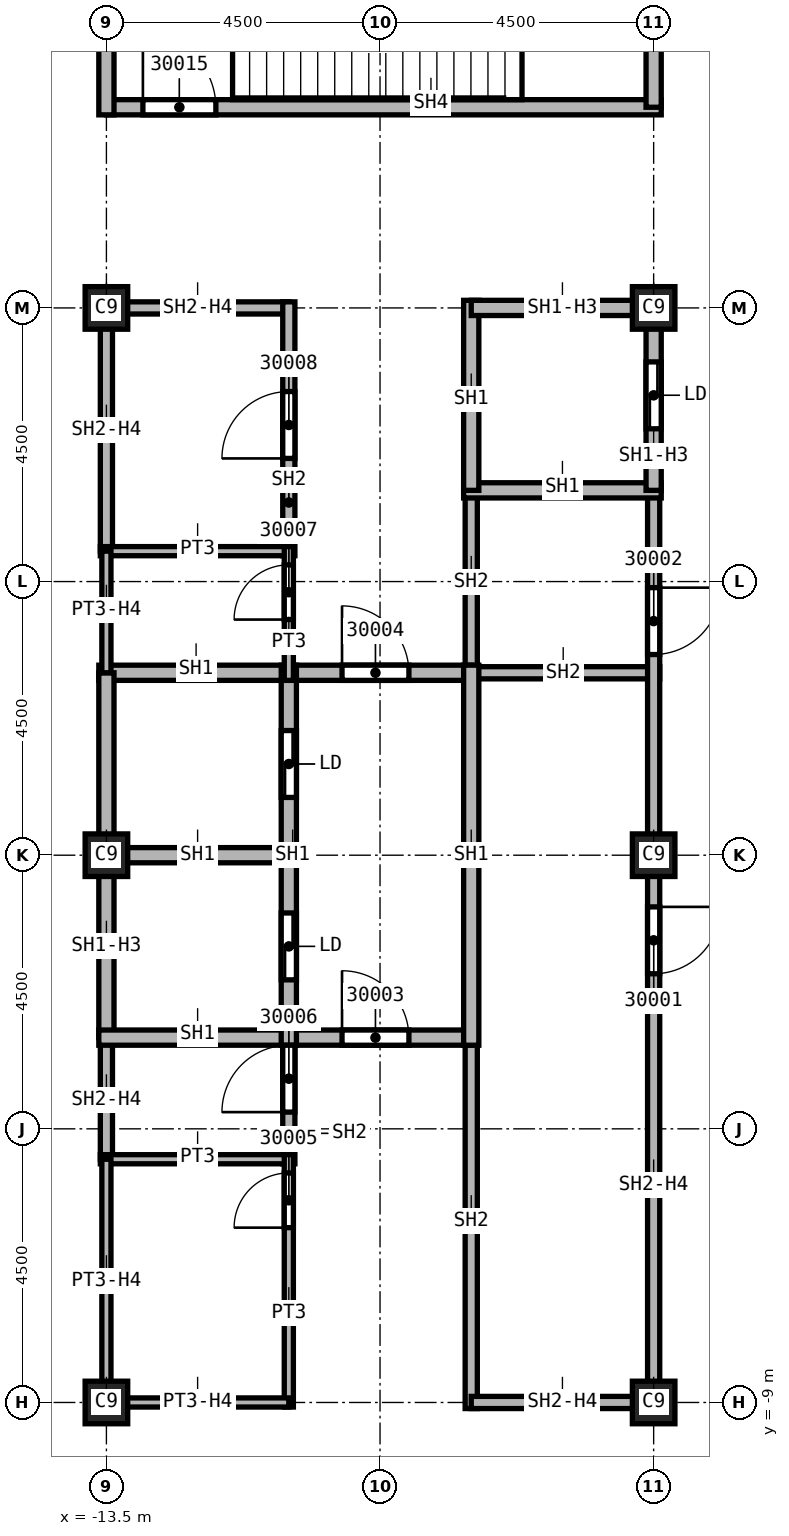
"""IFC4 building model, lengths in metres.
Left out: names, types, materials, properties, quantities, classifications, styles, units other than length and angle.
Written with IfcOpenShell. Run it as: python <this file> out.ifc"""

import sys

from ifc_helpers import new_model, si_unit, direction, frame, frame_2d, origin, origin_2d, place, context, subcontext, project, spatial, rectangle, extrude, element, fill, save


model = new_model("IFC4")
c1 = context("Model", 3, precision=1e-05, world=origin(), true_north=direction((0.0, 1.0)))
c2 = subcontext(c1, "Body", "Model", "MODEL_VIEW")
j1 = project(units=[si_unit("LENGTHUNIT", "METRE"), si_unit("PLANEANGLEUNIT", "RADIAN")], contexts=[c1])
p1 = place(None, origin())
s1 = spatial("IfcSite", under=j1, at=p1, CompositionType="ELEMENT")
p2 = place(p1, origin())
s2 = spatial("IfcBuilding", under=s1, at=p2, CompositionType="ELEMENT")
p3 = place(p2, frame((0.0, 0.0, 320.0)))
s3 = spatial("IfcBuildingStorey", under=s2, at=p3, CompositionType="ELEMENT", Elevation=320.0)
for number, where, z_axis, x_axis in (
    (1, (-4.5, 0.0, 0.0), (0.0, 0.0, 1.0), (1.0, 0.0, 0.0)),
    (2, (-4.5, 9.0, 0.0), (0.0, 0.0, 1.0), (1.0, 0.0, 0.0)),
    (3, (-4.5, -9.0, 0.0), (0.0, 0.0, 1.0), (1.0, 0.0, 0.0)),
    (4, (-13.5, 0.0, 0.0), (0.0, 0.0, 1.0), (1.0, 0.0, 0.0)),
    (5, (-13.5, 9.0, 0.0), (0.0, 0.0, 1.0), (1.0, 0.0, 0.0)),
    (6, (-13.5, -9.0, 0.0), (0.0, 0.0, 1.0), (1.0, 0.0, 0.0)),
):
    element("IfcColumn", number, at=place(p3, frame(where, z_axis=z_axis, x_axis=x_axis)), inside=s3, PredefinedType="COLUMN", context=c2, shape_type="SweptSolid", body=[
        extrude(rectangle(XDim=0.7, YDim=0.7, at=origin_2d()), origin(), (0.0, 0.0, 1.0), 5.74),
    ])
p4 = place(p3, frame((-13.5, -5.0, 0.0), z_axis=(0.0, 0.0, 1.0), x_axis=(0.0, 1.0, 0.0)))
e7 = element("IfcWall", 7, at=p4, inside=s3, PredefinedType="SOLIDWALL", context=c2, shape_type="SweptSolid", body=[
    extrude(rectangle(XDim=2.0, YDim=0.2, at=frame_2d((1.0, 0.0))), origin(), (0.0, 0.0, 1.0), 5.062),
])
p5 = place(p3, frame((-13.5, 5.0, 0.0), z_axis=(0.0, 0.0, 1.0), x_axis=(0.0, 1.0, 0.0)))
e8 = element("IfcWall", 8, at=p5, inside=s3, PredefinedType="SOLIDWALL", context=c2, shape_type="SweptSolid", body=[
    extrude(rectangle(XDim=4.1, YDim=0.2, at=frame_2d((2.05, 0.0))), origin(), (0.0, 0.0, 1.0), 5.062),
])
p6 = place(p3, frame((-13.5, 9.0, 0.0), z_axis=(0.0, 0.0, 1.0), x_axis=(1.0, 0.0, 0.0)))
e9 = element("IfcWall", 9, at=p6, inside=s3, PredefinedType="SOLIDWALL", context=c2, shape_type="SweptSolid", body=[
    extrude(rectangle(XDim=3.0, YDim=0.2, at=frame_2d((1.5, 0.0))), origin(), (0.0, 0.0, 1.0), 5.062),
])
p7 = place(p3, frame((-10.5, -5.075, 0.0), z_axis=(0.0, 0.0, 1.0), x_axis=(0.0, 1.0, 0.0)))
e10 = element("IfcWall", 10, at=p7, inside=s3, PredefinedType="SOLIDWALL", context=c2, shape_type="SweptSolid", body=[
    extrude(rectangle(XDim=2.2, YDim=0.2, at=frame_2d((1.1, 0.0))), origin(), (0.0, 0.0, 1.0), 5.74),
])
p8 = place(p7, frame((0.85, 0.0, 0.0)))
e11 = element("IfcOpeningElement", 11, at=p8, cuts=e10, PredefinedType="OPENING", context=c2, shape_type="SweptSolid", body=[
    extrude(rectangle(XDim=1.1, YDim=2.1, at=frame_2d((0.55, 1.05))), frame((0.0, 0.1, 0.0), z_axis=(0.0, -1.0, 0.0), x_axis=(1.0, 0.0, 0.0)), (0.0, 0.0, 1.0), 0.2),
])
p9 = place(p3, frame((-10.5, 4.925, 0.0), z_axis=(0.0, 0.0, 1.0), x_axis=(0.0, 1.0, 0.0)))
e12 = element("IfcWall", 12, at=p9, inside=s3, PredefinedType="SOLIDWALL", context=c2, shape_type="SweptSolid", body=[
    extrude(rectangle(XDim=4.175, YDim=0.2, at=frame_2d((2.087, 0.0))), origin(), (0.0, 0.0, 1.0), 5.74),
])
p10 = place(p9, frame((1.6, 0.0, 0.0)))
e13 = element("IfcOpeningElement", 13, at=p10, cuts=e12, PredefinedType="OPENING", context=c2, shape_type="SweptSolid", body=[
    extrude(rectangle(XDim=1.1, YDim=2.1, at=frame_2d((0.55, 1.05))), frame((0.0, 0.1, 0.0), z_axis=(0.0, -1.0, 0.0), x_axis=(1.0, 0.0, 0.0)), (0.0, 0.0, 1.0), 0.2),
])
p11 = place(p3, frame((-7.625, 3.0, 0.0), z_axis=(0.0, 0.0, 1.0), x_axis=(1.0, 0.0, 0.0)))
e14 = element("IfcWall", 14, at=p11, inside=s3, PredefinedType="SOLIDWALL", context=c2, shape_type="SweptSolid", body=[
    extrude(rectangle(XDim=3.225, YDim=0.2, at=frame_2d((1.613, 0.0))), origin(), (0.0, 0.0, 1.0), 5.74),
])
p12 = place(p3, frame((-7.5, -9.1, 0.0), z_axis=(0.0, 0.0, 1.0), x_axis=(0.0, 1.0, 0.0)))
e15 = element("IfcWall", 15, at=p12, inside=s3, PredefinedType="SOLIDWALL", context=c2, shape_type="SweptSolid", body=[
    extrude(rectangle(XDim=6.225, YDim=0.2, at=frame_2d((3.113, 0.0))), origin(), (0.0, 0.0, 1.0), 5.74),
])
p13 = place(p3, frame((-7.5, 2.875, 0.0), z_axis=(0.0, 0.0, 1.0), x_axis=(0.0, 1.0, 0.0)))
e16 = element("IfcWall", 16, at=p13, inside=s3, PredefinedType="SOLIDWALL", context=c2, shape_type="SweptSolid", body=[
    extrude(rectangle(XDim=3.125, YDim=0.2, at=frame_2d((1.562, 0.0))), origin(), (0.0, 0.0, 1.0), 5.74),
])
p14 = place(p3, frame((-4.5, -9.0, 0.0), z_axis=(0.0, 0.0, 1.0), x_axis=(-1.0, 0.0, 0.0)))
e17 = element("IfcWall", 17, at=p14, inside=s3, PredefinedType="SOLIDWALL", context=c2, shape_type="SweptSolid", body=[
    extrude(rectangle(XDim=3.0, YDim=0.2, at=frame_2d((1.5, 0.0))), origin(), (0.0, 0.0, 1.0), 5.062),
])
p15 = place(p3, frame((-4.5, 6.0, 0.0), z_axis=(0.0, 0.0, 1.0), x_axis=(0.0, -1.0, 0.0)))
e18 = element("IfcWall", 18, at=p15, inside=s3, PredefinedType="SOLIDWALL", context=c2, shape_type="SweptSolid", body=[
    extrude(rectangle(XDim=15.1, YDim=0.2, at=frame_2d((7.55, 0.0))), origin(), (0.0, 0.0, 1.0), 5.062),
])
p16 = place(p15, frame((6.85, 0.0, 0.0)))
e19 = element("IfcOpeningElement", 19, at=p16, cuts=e18, PredefinedType="OPENING", context=c2, shape_type="SweptSolid", body=[
    extrude(rectangle(XDim=1.1, YDim=2.1, at=frame_2d((0.55, 1.05))), frame((0.0, 0.1, 0.0), z_axis=(0.0, -1.0, 0.0), x_axis=(1.0, 0.0, 0.0)), (0.0, 0.0, 1.0), 0.2),
])
p17 = place(p15, frame((1.6, 0.0, 0.0)))
e20 = element("IfcOpeningElement", 20, at=p17, cuts=e18, PredefinedType="OPENING", context=c2, shape_type="SweptSolid", body=[
    extrude(rectangle(XDim=1.1, YDim=2.1, at=frame_2d((0.55, 1.05))), frame((0.0, 0.1, 0.0), z_axis=(0.0, -1.0, 0.0), x_axis=(1.0, 0.0, 0.0)), (0.0, 0.0, 1.0), 0.2),
])
p18 = place(p3, frame((-13.625, 0.0, 0.0), z_axis=(0.0, 0.0, 1.0), x_axis=(1.0, 0.0, 0.0)))
e21 = element("IfcWall", 21, at=p18, inside=s3, PredefinedType="SOLIDWALL", context=c2, shape_type="SweptSolid", body=[
    extrude(rectangle(XDim=3.125, YDim=0.25, at=frame_2d((1.562, 0.0))), origin(), (0.0, 0.0, 1.0), 5.74),
])
p19 = place(p3, frame((-13.625, 3.0, 0.0), z_axis=(0.0, 0.0, 1.0), x_axis=(1.0, 0.0, 0.0)))
e22 = element("IfcWall", 22, at=p19, inside=s3, PredefinedType="SOLIDWALL", context=c2, shape_type="SweptSolid", body=[
    extrude(rectangle(XDim=6.125, YDim=0.25, at=frame_2d((3.062, 0.0))), origin(), (0.0, 0.0, 1.0), 5.74),
])
p20 = place(p19, frame((4.0, 0.0, 0.0)))
e23 = element("IfcOpeningElement", 23, at=p20, cuts=e22, PredefinedType="OPENING", context=c2, shape_type="SweptSolid", body=[
    extrude(rectangle(XDim=1.1, YDim=2.1, at=frame_2d((0.55, 1.05))), frame((0.0, 0.125, 0.0), z_axis=(0.0, -1.0, 0.0), x_axis=(1.0, 0.0, 0.0)), (0.0, 0.0, 1.0), 0.25),
])
p21 = place(p3, frame((-13.5, -3.0, 0.0), z_axis=(0.0, 0.0, 1.0), x_axis=(0.0, 1.0, 0.0)))
e24 = element("IfcWall", 24, at=p21, inside=s3, PredefinedType="SOLIDWALL", context=c2, shape_type="SweptSolid", body=[
    extrude(rectangle(XDim=6.0, YDim=0.25, at=frame_2d((3.0, 0.0))), origin(), (0.0, 0.0, 1.0), 5.062),
])
p22 = place(p3, frame((-13.625, -3.0, 0.0), z_axis=(0.0, 0.0, 1.0), x_axis=(1.0, 0.0, 0.0)))
e25 = element("IfcWall", 25, at=p22, inside=s3, PredefinedType="SOLIDWALL", context=c2, shape_type="SweptSolid", body=[
    extrude(rectangle(XDim=6.125, YDim=0.25, at=frame_2d((3.062, 0.0))), origin(), (0.0, 0.0, 1.0), 5.74),
])
p23 = place(p22, frame((4.0, 0.0, 0.0)))
e26 = element("IfcOpeningElement", 26, at=p23, cuts=e25, PredefinedType="OPENING", context=c2, shape_type="SweptSolid", body=[
    extrude(rectangle(XDim=1.1, YDim=2.1, at=frame_2d((0.55, 1.05))), frame((0.0, 0.125, 0.0), z_axis=(0.0, -1.0, 0.0), x_axis=(1.0, 0.0, 0.0)), (0.0, 0.0, 1.0), 0.25),
])
p24 = place(p3, frame((-10.5, -3.125, 0.0), z_axis=(0.0, 0.0, 1.0), x_axis=(0.0, 1.0, 0.0)))
e27 = element("IfcWall", 27, at=p24, inside=s3, PredefinedType="SOLIDWALL", context=c2, shape_type="SweptSolid", body=[
    extrude(rectangle(XDim=6.25, YDim=0.25, at=frame_2d((3.125, 0.0))), origin(), (0.0, 0.0, 1.0), 5.74),
])
p25 = place(p24, frame((1.075, 0.0, 0.0)))
e28 = element("IfcOpeningElement", 28, at=p25, cuts=e27, PredefinedType="OPENING", context=c2, shape_type="SweptSolid", body=[
    extrude(rectangle(XDim=1.1, YDim=2.1, at=frame_2d((0.55, 1.05))), frame((0.0, 0.125, 0.0), z_axis=(0.0, -1.0, 0.0), x_axis=(1.0, 0.0, 0.0)), (0.0, 0.0, 1.0), 0.25),
])
p26 = place(p24, frame((4.075, 0.0, 0.0)))
e29 = element("IfcOpeningElement", 29, at=p26, cuts=e27, PredefinedType="OPENING", context=c2, shape_type="SweptSolid", body=[
    extrude(rectangle(XDim=1.1, YDim=2.1, at=frame_2d((0.55, 1.05))), frame((0.0, 0.125, 0.0), z_axis=(0.0, -1.0, 0.0), x_axis=(1.0, 0.0, 0.0)), (0.0, 0.0, 1.0), 0.25),
])
p27 = place(p3, frame((-7.625, 6.0, 0.0), z_axis=(0.0, 0.0, 1.0), x_axis=(1.0, 0.0, 0.0)))
e30 = element("IfcWall", 30, at=p27, inside=s3, PredefinedType="SOLIDWALL", context=c2, shape_type="SweptSolid", body=[
    extrude(rectangle(XDim=3.25, YDim=0.25, at=frame_2d((1.625, 0.0))), origin(), (0.0, 0.0, 1.0), 5.74),
])
p28 = place(p3, frame((-7.5, -3.125, 0.0), z_axis=(0.0, 0.0, 1.0), x_axis=(0.0, 1.0, 0.0)))
e31 = element("IfcWall", 31, at=p28, inside=s3, PredefinedType="SOLIDWALL", context=c2, shape_type="SweptSolid", body=[
    extrude(rectangle(XDim=6.25, YDim=0.25, at=frame_2d((3.125, 0.0))), origin(), (0.0, 0.0, 1.0), 5.74),
])
p29 = place(p3, frame((-7.5, 6.0, 0.0), z_axis=(0.0, 0.0, 1.0), x_axis=(0.0, 1.0, 0.0)))
e32 = element("IfcWall", 32, at=p29, inside=s3, PredefinedType="SOLIDWALL", context=c2, shape_type="SweptSolid", body=[
    extrude(rectangle(XDim=3.125, YDim=0.25, at=frame_2d((1.562, 0.0))), origin(), (0.0, 0.0, 1.0), 5.74),
])
p30 = place(p3, frame((-7.5, 9.0, 0.0), z_axis=(0.0, 0.0, 1.0), x_axis=(1.0, 0.0, 0.0)))
e33 = element("IfcWall", 33, at=p30, inside=s3, PredefinedType="SOLIDWALL", context=c2, shape_type="SweptSolid", body=[
    extrude(rectangle(XDim=3.0, YDim=0.25, at=frame_2d((1.5, 0.0))), origin(), (0.0, 0.0, 1.0), 5.062),
])
p31 = place(p3, frame((-4.5, 9.125, 0.0), z_axis=(0.0, 0.0, 1.0), x_axis=(0.0, -1.0, 0.0)))
e34 = element("IfcWall", 34, at=p31, inside=s3, PredefinedType="SOLIDWALL", context=c2, shape_type="SweptSolid", body=[
    extrude(rectangle(XDim=3.125, YDim=0.25, at=frame_2d((1.562, 0.0))), origin(), (0.0, 0.0, 1.0), 5.062),
])
p32 = place(p31, frame((1.012, 0.0, 0.0)))
e35 = element("IfcOpeningElement", 35, at=p32, cuts=e34, PredefinedType="OPENING", context=c2, shape_type="SweptSolid", body=[
    extrude(rectangle(XDim=1.1, YDim=2.1, at=frame_2d((0.55, 1.05))), frame((0.0, 0.125, 0.0), z_axis=(0.0, -1.0, 0.0), x_axis=(1.0, 0.0, 0.0)), (0.0, 0.0, 1.0), 0.25),
])
p33 = place(p3, frame((-13.5, 12.3, 0.0), z_axis=(0.0, 0.0, 1.0), x_axis=(1.0, 0.0, 0.0)))
e36 = element("IfcWall", 36, at=p33, inside=s3, PredefinedType="SOLIDWALL", context=c2, shape_type="SweptSolid", body=[
    extrude(rectangle(XDim=9.125, YDim=0.25, at=frame_2d((4.562, 0.0))), origin(), (0.0, 0.0, 1.0), 5.74),
])
p34 = place(p33, frame((0.6, 0.0, 0.0)))
e37 = element("IfcOpeningElement", 37, at=p34, cuts=e36, PredefinedType="OPENING", context=c2, shape_type="SweptSolid", body=[
    extrude(rectangle(XDim=1.2, YDim=2.1, at=frame_2d((0.6, 1.05))), frame((0.0, 0.125, 0.0), z_axis=(0.0, -1.0, 0.0), x_axis=(1.0, 0.0, 0.0)), (0.0, 0.0, 1.0), 0.25),
])
p35 = place(p3, frame((-13.5, 12.175, 0.0), z_axis=(0.0, 0.0, 1.0), x_axis=(0.0, 1.0, 0.0)))
e38 = element("IfcWall", 38, at=p35, inside=s3, PredefinedType="SOLIDWALL", context=c2, shape_type="SweptSolid", body=[
    extrude(rectangle(XDim=4.75, YDim=0.25, at=frame_2d((2.375, 0.0))), origin(), (0.0, 0.0, 1.0), 5.74),
])
p36 = place(p3, frame((-4.5, 16.8, 0.0), z_axis=(0.0, 0.0, 1.0), x_axis=(0.0, -1.0, 0.0)))
e39 = element("IfcWall", 39, at=p36, inside=s3, PredefinedType="SOLIDWALL", context=c2, shape_type="SweptSolid", body=[
    extrude(rectangle(XDim=4.5, YDim=0.25, at=frame_2d((2.25, 0.0))), origin(), (0.0, 0.0, 1.0), 5.74),
])
for number, where, z_axis, x_axis in (
    (40, (-13.6, -5.0, 0.0), (0.0, 0.0, 1.0), (1.0, 0.0, 0.0)),
    (41, (-13.6, 5.0, 0.0), (0.0, 0.0, 1.0), (1.0, 0.0, 0.0)),
):
    element("IfcWall", number, at=place(p3, frame(where, z_axis=z_axis, x_axis=x_axis)), inside=s3, PredefinedType="PARTITIONING", context=c2, shape_type="SweptSolid", body=[
        extrude(rectangle(XDim=3.1, YDim=0.15, at=frame_2d((1.55, 0.0))), origin(), (0.0, 0.0, 1.0), 5.74),
    ])
p37 = place(p3, frame((-13.5, -9.075, 0.0), z_axis=(0.0, 0.0, 1.0), x_axis=(0.0, 1.0, 0.0)))
e42 = element("IfcWall", 42, at=p37, inside=s3, PredefinedType="PARTITIONING", context=c2, shape_type="SweptSolid", body=[
    extrude(rectangle(XDim=4.075, YDim=0.15, at=frame_2d((2.038, 0.0))), origin(), (0.0, 0.0, 1.0), 5.062),
])
p38 = place(p3, frame((-13.5, 3.0, 0.0), z_axis=(0.0, 0.0, 1.0), x_axis=(0.0, 1.0, 0.0)))
e43 = element("IfcWall", 43, at=p38, inside=s3, PredefinedType="PARTITIONING", context=c2, shape_type="SweptSolid", body=[
    extrude(rectangle(XDim=2.0, YDim=0.15, at=frame_2d((1.0, 0.0))), origin(), (0.0, 0.0, 1.0), 5.062),
])
p39 = place(p3, frame((-10.5, -9.075, 0.0), z_axis=(0.0, 0.0, 1.0), x_axis=(0.0, 1.0, 0.0)))
e44 = element("IfcWall", 44, at=p39, inside=s3, PredefinedType="PARTITIONING", context=c2, shape_type="SweptSolid", body=[
    extrude(rectangle(XDim=4.15, YDim=0.15, at=frame_2d((2.075, 0.0))), origin(), (0.0, 0.0, 1.0), 5.74),
])
p40 = place(p39, frame((2.95, 0.0, 0.0)))
e45 = element("IfcOpeningElement", 45, at=p40, cuts=e44, PredefinedType="OPENING", context=c2, shape_type="SweptSolid", body=[
    extrude(rectangle(XDim=0.9, YDim=2.1, at=frame_2d((0.45, 1.05))), frame((0.0, 0.075, 0.0), z_axis=(0.0, -1.0, 0.0), x_axis=(1.0, 0.0, 0.0)), (0.0, 0.0, 1.0), 0.15),
])
p41 = place(p3, frame((-10.5, -9.0, 0.0), z_axis=(0.0, 0.0, 1.0), x_axis=(-1.0, 0.0, 0.0)))
e46 = element("IfcWall", 46, at=p41, inside=s3, PredefinedType="PARTITIONING", context=c2, shape_type="SweptSolid", body=[
    extrude(rectangle(XDim=3.0, YDim=0.15, at=frame_2d((1.5, 0.0))), origin(), (0.0, 0.0, 1.0), 5.062),
])
p42 = place(p3, frame((-10.5, 2.875, 0.0), z_axis=(0.0, 0.0, 1.0), x_axis=(0.0, 1.0, 0.0)))
e47 = element("IfcWall", 47, at=p42, inside=s3, PredefinedType="PARTITIONING", context=c2, shape_type="SweptSolid", body=[
    extrude(rectangle(XDim=2.2, YDim=0.15, at=frame_2d((1.1, 0.0))), origin(), (0.0, 0.0, 1.0), 5.74),
])
p43 = place(p42, frame((1.0, 0.0, 0.0)))
e48 = element("IfcOpeningElement", 48, at=p43, cuts=e47, PredefinedType="OPENING", context=c2, shape_type="SweptSolid", body=[
    extrude(rectangle(XDim=0.9, YDim=2.1, at=frame_2d((0.45, 1.05))), frame((0.0, 0.075, 0.0), z_axis=(0.0, -1.0, 0.0), x_axis=(1.0, 0.0, 0.0)), (0.0, 0.0, 1.0), 0.15),
])
p44 = place(p16, origin())
e49 = element("IfcDoor", 49, at=p44, inside=s3, OperationType="SINGLE_SWING_RIGHT", PredefinedType="DOOR", context=c2, shape_type="SweptSolid", body=[
    extrude(rectangle(XDim=1.1, YDim=2.1, at=frame_2d((0.55, 1.05))), frame((0.0, 0.025, 0.0), z_axis=(0.0, -1.0, 0.0), x_axis=(1.0, 0.0, 0.0)), (0.0, 0.0, 1.0), 0.05),
])
fill(e19, e49)
p45 = place(p17, origin())
e50 = element("IfcDoor", 50, at=p45, inside=s3, OperationType="SINGLE_SWING_LEFT", PredefinedType="DOOR", context=c2, shape_type="SweptSolid", body=[
    extrude(rectangle(XDim=1.1, YDim=2.1, at=frame_2d((0.55, 1.05))), frame((0.0, 0.025, 0.0), z_axis=(0.0, -1.0, 0.0), x_axis=(1.0, 0.0, 0.0)), (0.0, 0.0, 1.0), 0.05),
])
fill(e20, e50)
p46 = place(p23, origin())
e51 = element("IfcDoor", 51, at=p46, inside=s3, OperationType="SINGLE_SWING_RIGHT", PredefinedType="DOOR", context=c2, shape_type="SweptSolid", body=[
    extrude(rectangle(XDim=1.1, YDim=2.1, at=frame_2d((0.55, 1.05))), frame((0.0, 0.025, 0.0), z_axis=(0.0, -1.0, 0.0), x_axis=(1.0, 0.0, 0.0)), (0.0, 0.0, 1.0), 0.05),
])
fill(e26, e51)
p47 = place(p20, origin())
e52 = element("IfcDoor", 52, at=p47, inside=s3, OperationType="SINGLE_SWING_LEFT", PredefinedType="DOOR", context=c2, shape_type="SweptSolid", body=[
    extrude(rectangle(XDim=1.1, YDim=2.1, at=frame_2d((0.55, 1.05))), frame((0.0, 0.025, 0.0), z_axis=(0.0, -1.0, 0.0), x_axis=(1.0, 0.0, 0.0)), (0.0, 0.0, 1.0), 0.05),
])
fill(e23, e52)
p48 = place(p40, origin())
e53 = element("IfcDoor", 53, at=p48, inside=s3, OperationType="SINGLE_SWING_RIGHT", PredefinedType="DOOR", context=c2, shape_type="SweptSolid", body=[
    extrude(rectangle(XDim=0.9, YDim=2.1, at=frame_2d((0.45, 1.05))), frame((0.0, 0.025, 0.0), z_axis=(0.0, -1.0, 0.0), x_axis=(1.0, 0.0, 0.0)), (0.0, 0.0, 1.0), 0.05),
])
fill(e45, e53)
p49 = place(p8, origin())
e54 = element("IfcDoor", 54, at=p49, inside=s3, OperationType="SINGLE_SWING_LEFT", PredefinedType="DOOR", context=c2, shape_type="SweptSolid", body=[
    extrude(rectangle(XDim=1.1, YDim=2.1, at=frame_2d((0.55, 1.05))), frame((0.0, 0.025, 0.0), z_axis=(0.0, -1.0, 0.0), x_axis=(1.0, 0.0, 0.0)), (0.0, 0.0, 1.0), 0.05),
])
fill(e11, e54)
p50 = place(p43, origin())
e55 = element("IfcDoor", 55, at=p50, inside=s3, OperationType="SINGLE_SWING_RIGHT", PredefinedType="DOOR", context=c2, shape_type="SweptSolid", body=[
    extrude(rectangle(XDim=0.9, YDim=2.1, at=frame_2d((0.45, 1.05))), frame((0.0, 0.025, 0.0), z_axis=(0.0, -1.0, 0.0), x_axis=(1.0, 0.0, 0.0)), (0.0, 0.0, 1.0), 0.05),
])
fill(e48, e55)
p51 = place(p10, origin())
e56 = element("IfcDoor", 56, at=p51, inside=s3, OperationType="SINGLE_SWING_LEFT", PredefinedType="DOOR", context=c2, shape_type="SweptSolid", body=[
    extrude(rectangle(XDim=1.1, YDim=2.1, at=frame_2d((0.55, 1.05))), frame((0.0, 0.025, 0.0), z_axis=(0.0, -1.0, 0.0), x_axis=(1.0, 0.0, 0.0)), (0.0, 0.0, 1.0), 0.05),
])
fill(e13, e56)
p52 = place(p34, origin())
e57 = element("IfcDoor", 57, at=p52, inside=s3, OperationType="SINGLE_SWING_RIGHT", PredefinedType="DOOR", context=c2, shape_type="SweptSolid", body=[
    extrude(rectangle(XDim=1.2, YDim=2.1, at=frame_2d((0.6, 1.05))), frame((0.0, 0.025, 0.0), z_axis=(0.0, -1.0, 0.0), x_axis=(1.0, 0.0, 0.0)), (0.0, 0.0, 1.0), 0.05),
])
fill(e37, e57)
p53 = place(p32, origin())
e58 = element("IfcDoor", 58, at=p53, inside=s3, OperationType="SLIDING_TO_LEFT", PredefinedType="DOOR", context=c2, shape_type="SweptSolid", body=[
    extrude(rectangle(XDim=1.1, YDim=2.1, at=frame_2d((0.55, 1.05))), frame((0.0, 0.025, 0.0), z_axis=(0.0, -1.0, 0.0), x_axis=(1.0, 0.0, 0.0)), (0.0, 0.0, 1.0), 0.05),
])
fill(e35, e58)
p54 = place(p25, origin())
e59 = element("IfcDoor", 59, at=p54, inside=s3, OperationType="SLIDING_TO_LEFT", PredefinedType="DOOR", context=c2, shape_type="SweptSolid", body=[
    extrude(rectangle(XDim=1.1, YDim=2.1, at=frame_2d((0.55, 1.05))), frame((0.0, 0.025, 0.0), z_axis=(0.0, -1.0, 0.0), x_axis=(1.0, 0.0, 0.0)), (0.0, 0.0, 1.0), 0.05),
])
fill(e28, e59)
p55 = place(p26, origin())
e60 = element("IfcDoor", 60, at=p55, inside=s3, OperationType="SLIDING_TO_LEFT", PredefinedType="DOOR", context=c2, shape_type="SweptSolid", body=[
    extrude(rectangle(XDim=1.1, YDim=2.1, at=frame_2d((0.55, 1.05))), frame((0.0, 0.025, 0.0), z_axis=(0.0, -1.0, 0.0), x_axis=(1.0, 0.0, 0.0)), (0.0, 0.0, 1.0), 0.05),
])
fill(e29, e60)
save(model, sys.argv[1])
